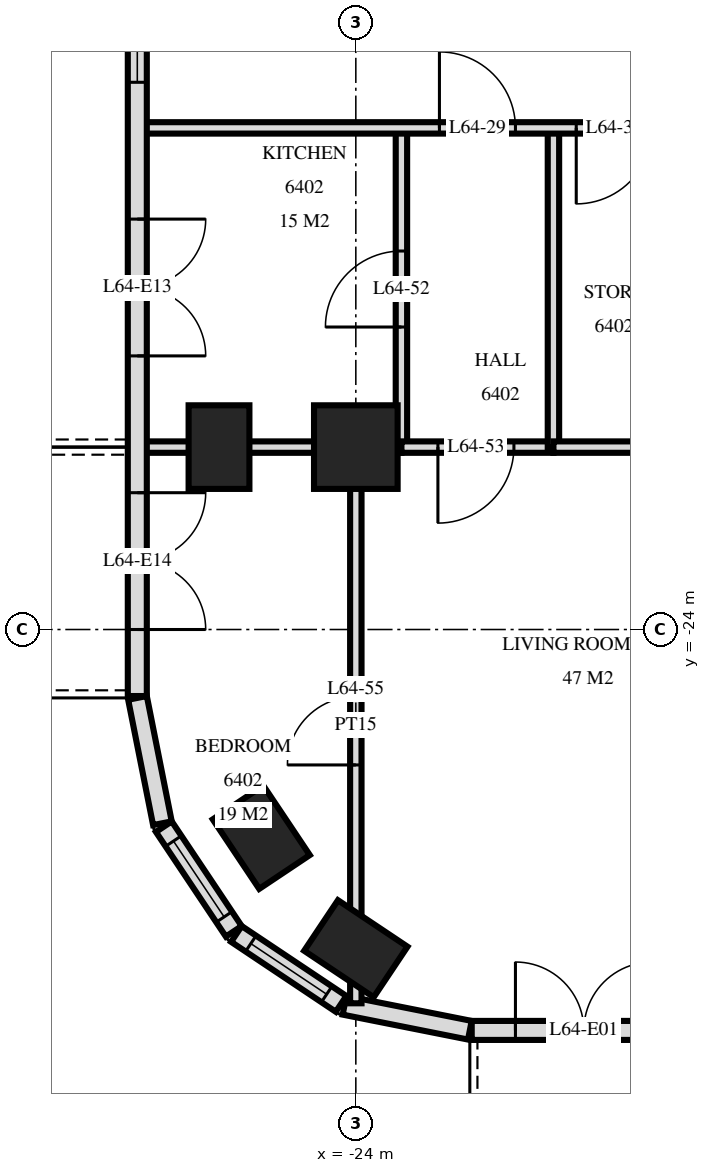
"""IFC4 building model, lengths in metres.
Left out: names, types, materials, properties, quantities, classifications, styles, units other than length and angle.
Written with IfcOpenShell. Run it as: python <this file> out.ifc"""

import sys

from ifc_helpers import new_model, si_unit, direction, frame, frame_2d, origin, origin_2d, place, context, subcontext, project, spatial, rectangle, extrude, element, fill, save


model = new_model("IFC4")
c1 = context("Model", 3, precision=1e-05, world=origin(), true_north=direction((0.0, 1.0)))
c2 = subcontext(c1, "Body", "Model", "MODEL_VIEW")
j1 = project(units=[si_unit("LENGTHUNIT", "METRE"), si_unit("PLANEANGLEUNIT", "RADIAN")], contexts=[c1])
p1 = place(None, origin())
s1 = spatial("IfcSite", under=j1, at=p1, CompositionType="ELEMENT")
p2 = place(p1, origin())
s2 = spatial("IfcBuilding", under=s1, at=p2, CompositionType="ELEMENT")
p3 = place(p2, frame((0.0, 0.0, 243.1)))
s3 = spatial("IfcBuildingStorey", under=s2, at=p3, CompositionType="ELEMENT", Elevation=243.1)
for number, where, z_axis, x_axis in (
    (1, (-25.8, -21.6, 0.0), (0.0, 0.0, 1.0), (0.0, 1.0, 0.0)),
    (2, (-25.244, -26.733, 0.0), (0.0, 0.0, 1.0), (-0.556, 0.831, 0.0)),
    (3, (-24.0, -28.2, 0.0), (0.0, 0.0, 1.0), (-0.831, 0.556, 0.0)),
):
    element("IfcColumn", number, at=place(p3, frame(where, z_axis=z_axis, x_axis=x_axis)), inside=s3, PredefinedType="COLUMN", context=c2, shape_type="SweptSolid", body=[
        extrude(rectangle(XDim=1.1, YDim=0.8, at=origin_2d()), origin(), (0.0, 0.0, 1.0), 3.5),
    ])
p4 = place(p3, frame((-24.0, -21.6, 0.0), z_axis=(0.0, 0.0, 1.0), x_axis=(1.0, 0.0, 0.0)))
e4 = element("IfcColumn", 4, at=p4, inside=s3, PredefinedType="COLUMN", context=c2, shape_type="SweptSolid", body=[
    extrude(rectangle(XDim=1.1, YDim=1.1, at=origin_2d()), origin(), (0.0, 0.0, 1.0), 3.5),
])
p5 = place(p3, frame((-26.875, -3.325, 0.0), z_axis=(0.0, 0.0, 1.0), x_axis=(0.0, -1.0, 0.0)))
e5 = element("IfcWall", 5, at=p5, inside=s3, PredefinedType="SOLIDWALL", context=c2, shape_type="SweptSolid", body=[
    extrude(rectangle(XDim=21.551, YDim=0.25, at=frame_2d((10.775, 0.0))), origin(), (0.0, 0.0, 1.0), 3.2),
])
p6 = place(p5, frame((7.525, 0.0, 0.0)))
e6 = element("IfcOpeningElement", 6, at=p6, cuts=e5, PredefinedType="OPENING", context=c2, shape_type="SweptSolid", body=[
    extrude(rectangle(XDim=1.8, YDim=2.4, at=frame_2d((0.9, 1.2))), frame((0.0, 0.135, 0.0), z_axis=(0.0, -1.0, 0.0), x_axis=(1.0, 0.0, 0.0)), (0.0, 0.0, 1.0), 0.27),
])
p7 = place(p5, frame((12.275, 0.0, 0.9)))
e7 = element("IfcOpeningElement", 7, at=p7, cuts=e5, PredefinedType="OPENING", context=c2, shape_type="SweptSolid", body=[
    extrude(rectangle(XDim=1.2, YDim=1.5, at=frame_2d((0.6, 0.75))), frame((0.0, 0.135, 0.0), z_axis=(0.0, -1.0, 0.0), x_axis=(1.0, 0.0, 0.0)), (0.0, 0.0, 1.0), 0.27),
])
p8 = place(p5, frame((15.275, 0.0, 0.0)))
e8 = element("IfcOpeningElement", 8, at=p8, cuts=e5, PredefinedType="OPENING", context=c2, shape_type="SweptSolid", body=[
    extrude(rectangle(XDim=1.8, YDim=2.4, at=frame_2d((0.9, 1.2))), frame((0.0, 0.135, 0.0), z_axis=(0.0, -1.0, 0.0), x_axis=(1.0, 0.0, 0.0)), (0.0, 0.0, 1.0), 0.27),
])
p9 = place(p5, frame((18.875, 0.0, 0.0)))
e9 = element("IfcOpeningElement", 9, at=p9, cuts=e5, PredefinedType="OPENING", context=c2, shape_type="SweptSolid", body=[
    extrude(rectangle(XDim=1.8, YDim=2.4, at=frame_2d((0.9, 1.2))), frame((0.0, 0.135, 0.0), z_axis=(0.0, -1.0, 0.0), x_axis=(1.0, 0.0, 0.0)), (0.0, 0.0, 1.0), 0.27),
])
p10 = place(p3, frame((-26.873, -24.9, 0.0), z_axis=(0.0, 0.0, 1.0), x_axis=(0.195026884138, -0.980797896849, 0.0)))
e10 = element("IfcWall", 10, at=p10, inside=s3, PredefinedType="SOLIDWALL", context=c2, shape_type="SweptSolid", body=[
    extrude(rectangle(XDim=1.681, YDim=0.25, at=frame_2d((0.841, 0.0))), origin(), (0.0, 0.0, 1.0), 3.2),
])
p11 = place(p3, frame((-26.526, -26.594, 0.0), z_axis=(0.0, 0.0, 1.0), x_axis=(0.55555029066, -0.831482937015, 0.0)))
e11 = element("IfcWall", 11, at=p11, inside=s3, PredefinedType="SOLIDWALL", context=c2, shape_type="SweptSolid", body=[
    extrude(rectangle(XDim=1.656, YDim=0.25, at=frame_2d((0.828, 0.0))), origin(), (0.0, 0.0, 1.0), 3.2),
])
p12 = place(p11, frame((0.228, 0.0, 0.9)))
e12 = element("IfcOpeningElement", 12, at=p12, cuts=e11, PredefinedType="OPENING", context=c2, shape_type="SweptSolid", body=[
    extrude(rectangle(XDim=1.2, YDim=1.5, at=frame_2d((0.6, 0.75))), frame((0.0, 0.135, 0.0), z_axis=(0.0, -1.0, 0.0), x_axis=(1.0, 0.0, 0.0)), (0.0, 0.0, 1.0), 0.27),
])
p13 = place(p3, frame((-25.571, -28.006, 0.0), z_axis=(0.0, 0.0, 1.0), x_axis=(0.831482937015, -0.55555029066, 0.0)))
e13 = element("IfcWall", 13, at=p13, inside=s3, PredefinedType="SOLIDWALL", context=c2, shape_type="SweptSolid", body=[
    extrude(rectangle(XDim=1.656, YDim=0.25, at=frame_2d((0.828, 0.0))), origin(), (0.0, 0.0, 1.0), 3.2),
])
p14 = place(p13, frame((0.228, 0.0, 0.9)))
e14 = element("IfcOpeningElement", 14, at=p14, cuts=e13, PredefinedType="OPENING", context=c2, shape_type="SweptSolid", body=[
    extrude(rectangle(XDim=1.2, YDim=1.5, at=frame_2d((0.6, 0.75))), frame((0.0, 0.135, 0.0), z_axis=(0.0, -1.0, 0.0), x_axis=(1.0, 0.0, 0.0)), (0.0, 0.0, 1.0), 0.27),
])
p15 = place(p3, frame((-24.149, -28.945, 0.0), z_axis=(0.0, 0.0, 1.0), x_axis=(0.980775640221, -0.19513878023, 0.0)))
e15 = element("IfcWall", 15, at=p15, inside=s3, PredefinedType="SOLIDWALL", context=c2, shape_type="SweptSolid", body=[
    extrude(rectangle(XDim=1.681, YDim=0.25, at=frame_2d((0.841, 0.0))), origin(), (0.0, 0.0, 1.0), 3.2),
])
p16 = place(p3, frame((-22.475, -29.275, 0.0), z_axis=(0.0, 0.0, 1.0), x_axis=(1.0, 0.0, 0.0)))
e16 = element("IfcWall", 16, at=p16, inside=s3, PredefinedType="SOLIDWALL", context=c2, shape_type="SweptSolid", body=[
    extrude(rectangle(XDim=44.951, YDim=0.25, at=frame_2d((22.475, 0.0))), origin(), (0.0, 0.0, 1.0), 3.2),
])
p17 = place(p16, frame((0.575, 0.0, 0.0)))
e17 = element("IfcOpeningElement", 17, at=p17, cuts=e16, PredefinedType="OPENING", context=c2, shape_type="SweptSolid", body=[
    extrude(rectangle(XDim=1.8, YDim=2.4, at=frame_2d((0.9, 1.2))), frame((0.0, 0.135, 0.0), z_axis=(0.0, -1.0, 0.0), x_axis=(1.0, 0.0, 0.0)), (0.0, 0.0, 1.0), 0.27),
])
p18 = place(p16, frame((4.775, 0.0, 0.9)))
e18 = element("IfcOpeningElement", 18, at=p18, cuts=e16, PredefinedType="OPENING", context=c2, shape_type="SweptSolid", body=[
    extrude(rectangle(XDim=2.4, YDim=1.5, at=frame_2d((1.2, 0.75))), frame((0.0, 0.135, 0.0), z_axis=(0.0, -1.0, 0.0), x_axis=(1.0, 0.0, 0.0)), (0.0, 0.0, 1.0), 0.27),
])
p19 = place(p16, frame((8.075, 0.0, 0.0)))
e19 = element("IfcOpeningElement", 19, at=p19, cuts=e16, PredefinedType="OPENING", context=c2, shape_type="SweptSolid", body=[
    extrude(rectangle(XDim=1.8, YDim=2.4, at=frame_2d((0.9, 1.2))), frame((0.0, 0.135, 0.0), z_axis=(0.0, -1.0, 0.0), x_axis=(1.0, 0.0, 0.0)), (0.0, 0.0, 1.0), 0.27),
])
p20 = place(p16, frame((11.075, 0.0, 0.0)))
e20 = element("IfcOpeningElement", 20, at=p20, cuts=e16, PredefinedType="OPENING", context=c2, shape_type="SweptSolid", body=[
    extrude(rectangle(XDim=1.8, YDim=2.4, at=frame_2d((0.9, 1.2))), frame((0.0, 0.135, 0.0), z_axis=(0.0, -1.0, 0.0), x_axis=(1.0, 0.0, 0.0)), (0.0, 0.0, 1.0), 0.27),
])
p21 = place(p16, frame((13.775, 0.0, 0.9)))
e21 = element("IfcOpeningElement", 21, at=p21, cuts=e16, PredefinedType="OPENING", context=c2, shape_type="SweptSolid", body=[
    extrude(rectangle(XDim=2.4, YDim=1.5, at=frame_2d((1.2, 0.75))), frame((0.0, 0.135, 0.0), z_axis=(0.0, -1.0, 0.0), x_axis=(1.0, 0.0, 0.0)), (0.0, 0.0, 1.0), 0.27),
])
p22 = place(p16, frame((16.775, 0.0, 0.9)))
e22 = element("IfcOpeningElement", 22, at=p22, cuts=e16, PredefinedType="OPENING", context=c2, shape_type="SweptSolid", body=[
    extrude(rectangle(XDim=2.4, YDim=1.5, at=frame_2d((1.2, 0.75))), frame((0.0, 0.135, 0.0), z_axis=(0.0, -1.0, 0.0), x_axis=(1.0, 0.0, 0.0)), (0.0, 0.0, 1.0), 0.27),
])
p23 = place(p16, frame((20.075, 0.0, 0.0)))
e23 = element("IfcOpeningElement", 23, at=p23, cuts=e16, PredefinedType="OPENING", context=c2, shape_type="SweptSolid", body=[
    extrude(rectangle(XDim=1.8, YDim=2.4, at=frame_2d((0.9, 1.2))), frame((0.0, 0.135, 0.0), z_axis=(0.0, -1.0, 0.0), x_axis=(1.0, 0.0, 0.0)), (0.0, 0.0, 1.0), 0.27),
])
p24 = place(p16, frame((23.075, 0.0, 0.0)))
e24 = element("IfcOpeningElement", 24, at=p24, cuts=e16, PredefinedType="OPENING", context=c2, shape_type="SweptSolid", body=[
    extrude(rectangle(XDim=1.8, YDim=2.4, at=frame_2d((0.9, 1.2))), frame((0.0, 0.135, 0.0), z_axis=(0.0, -1.0, 0.0), x_axis=(1.0, 0.0, 0.0)), (0.0, 0.0, 1.0), 0.27),
])
p25 = place(p16, frame((25.775, 0.0, 0.9)))
e25 = element("IfcOpeningElement", 25, at=p25, cuts=e16, PredefinedType="OPENING", context=c2, shape_type="SweptSolid", body=[
    extrude(rectangle(XDim=2.4, YDim=1.5, at=frame_2d((1.2, 0.75))), frame((0.0, 0.135, 0.0), z_axis=(0.0, -1.0, 0.0), x_axis=(1.0, 0.0, 0.0)), (0.0, 0.0, 1.0), 0.27),
])
p26 = place(p16, frame((29.075, 0.0, 0.0)))
e26 = element("IfcOpeningElement", 26, at=p26, cuts=e16, PredefinedType="OPENING", context=c2, shape_type="SweptSolid", body=[
    extrude(rectangle(XDim=1.8, YDim=2.4, at=frame_2d((0.9, 1.2))), frame((0.0, 0.135, 0.0), z_axis=(0.0, -1.0, 0.0), x_axis=(1.0, 0.0, 0.0)), (0.0, 0.0, 1.0), 0.27),
])
p27 = place(p16, frame((31.775, 0.0, 0.9)))
e27 = element("IfcOpeningElement", 27, at=p27, cuts=e16, PredefinedType="OPENING", context=c2, shape_type="SweptSolid", body=[
    extrude(rectangle(XDim=2.4, YDim=1.5, at=frame_2d((1.2, 0.75))), frame((0.0, 0.135, 0.0), z_axis=(0.0, -1.0, 0.0), x_axis=(1.0, 0.0, 0.0)), (0.0, 0.0, 1.0), 0.27),
])
p28 = place(p16, frame((35.075, 0.0, 0.0)))
e28 = element("IfcOpeningElement", 28, at=p28, cuts=e16, PredefinedType="OPENING", context=c2, shape_type="SweptSolid", body=[
    extrude(rectangle(XDim=1.8, YDim=2.4, at=frame_2d((0.9, 1.2))), frame((0.0, 0.135, 0.0), z_axis=(0.0, -1.0, 0.0), x_axis=(1.0, 0.0, 0.0)), (0.0, 0.0, 1.0), 0.27),
])
p29 = place(p16, frame((41.075, 0.0, 0.0)))
e29 = element("IfcOpeningElement", 29, at=p29, cuts=e16, PredefinedType="OPENING", context=c2, shape_type="SweptSolid", body=[
    extrude(rectangle(XDim=1.8, YDim=2.4, at=frame_2d((0.9, 1.2))), frame((0.0, 0.135, 0.0), z_axis=(0.0, -1.0, 0.0), x_axis=(1.0, 0.0, 0.0)), (0.0, 0.0, 1.0), 0.27),
])
p30 = place(p3, frame((-21.4, -21.6, 0.0), z_axis=(0.0, 0.0, 1.0), x_axis=(0.0, 1.0, 0.0)))
e30 = element("IfcWall", 30, at=p30, inside=s3, PredefinedType="PARTITIONING", context=c2, shape_type="SweptSolid", body=[
    extrude(rectangle(XDim=4.2, YDim=0.15, at=frame_2d((2.1, 0.0))), origin(), (0.0, 0.0, 1.0), 3.22),
])
p31 = place(p3, frame((-23.4, -21.6, 0.0), z_axis=(0.0, 0.0, 1.0), x_axis=(0.0, 1.0, 0.0)))
e31 = element("IfcWall", 31, at=p31, inside=s3, PredefinedType="PARTITIONING", context=c2, shape_type="SweptSolid", body=[
    extrude(rectangle(XDim=4.2, YDim=0.15, at=frame_2d((2.1, 0.0))), origin(), (0.0, 0.0, 1.0), 3.22),
])
p32 = place(p31, frame((1.58, 0.0, 0.0)))
e32 = element("IfcOpeningElement", 32, at=p32, cuts=e31, PredefinedType="OPENING", context=c2, shape_type="SweptSolid", body=[
    extrude(rectangle(XDim=1.0, YDim=2.1, at=frame_2d((0.5, 1.05))), frame((0.0, 0.085, 0.0), z_axis=(0.0, -1.0, 0.0), x_axis=(1.0, 0.0, 0.0)), (0.0, 0.0, 1.0), 0.17),
])
p33 = place(p3, frame((-24.0, -28.918, 0.0), z_axis=(0.0, 0.0, 1.0), x_axis=(0.0, 1.0, 0.0)))
e33 = element("IfcWall", 33, at=p33, inside=s3, PredefinedType="PARTITIONING", context=c2, shape_type="SweptSolid", body=[
    extrude(rectangle(XDim=7.318, YDim=0.15, at=frame_2d((3.659, 0.0))), origin(), (0.0, 0.0, 1.0), 3.22),
])
p34 = place(p33, frame((3.136, 0.0, 0.0)))
e34 = element("IfcOpeningElement", 34, at=p34, cuts=e33, PredefinedType="OPENING", context=c2, shape_type="SweptSolid", body=[
    extrude(rectangle(XDim=0.9, YDim=2.1, at=frame_2d((0.45, 1.05))), frame((0.0, 0.085, 0.0), z_axis=(0.0, -1.0, 0.0), x_axis=(1.0, 0.0, 0.0)), (0.0, 0.0, 1.0), 0.17),
])
p35 = place(p3, frame((-23.4, -21.6, 0.0), z_axis=(0.0, 0.0, 1.0), x_axis=(1.0, 0.0, 0.0)))
e35 = element("IfcWall", 35, at=p35, inside=s3, PredefinedType="PARTITIONING", context=c2, shape_type="SweptSolid", body=[
    extrude(rectangle(XDim=2.0, YDim=0.15, at=frame_2d((1.0, 0.0))), origin(), (0.0, 0.0, 1.0), 3.22),
])
p36 = place(p35, frame((0.48, 0.0, 0.0)))
e36 = element("IfcOpeningElement", 36, at=p36, cuts=e35, PredefinedType="OPENING", context=c2, shape_type="SweptSolid", body=[
    extrude(rectangle(XDim=1.0, YDim=2.1, at=frame_2d((0.5, 1.05))), frame((0.0, 0.085, 0.0), z_axis=(0.0, -1.0, 0.0), x_axis=(1.0, 0.0, 0.0)), (0.0, 0.0, 1.0), 0.17),
])
p37 = place(p3, frame((-26.82, -21.6, 0.0), z_axis=(0.0, 0.0, 1.0), x_axis=(1.0, 0.0, 0.0)))
e37 = element("IfcWall", 37, at=p37, inside=s3, PredefinedType="PARTITIONING", context=c2, shape_type="SweptSolid", body=[
    extrude(rectangle(XDim=3.42, YDim=0.15, at=frame_2d((1.71, 0.0))), origin(), (0.0, 0.0, 1.0), 3.22),
])
p38 = place(p3, frame((-21.4, -21.6, 0.0), z_axis=(0.0, 0.0, 1.0), x_axis=(1.0, 0.0, 0.0)))
e38 = element("IfcWall", 38, at=p38, inside=s3, PredefinedType="PARTITIONING", context=c2, shape_type="SweptSolid", body=[
    extrude(rectangle(XDim=6.4, YDim=0.15, at=frame_2d((3.2, 0.0))), origin(), (0.0, 0.0, 1.0), 3.22),
])
p39 = place(p38, frame((4.78, 0.0, 0.0)))
e39 = element("IfcOpeningElement", 39, at=p39, cuts=e38, PredefinedType="OPENING", context=c2, shape_type="SweptSolid", body=[
    extrude(rectangle(XDim=0.8, YDim=2.1, at=frame_2d((0.4, 1.05))), frame((0.0, 0.085, 0.0), z_axis=(0.0, -1.0, 0.0), x_axis=(1.0, 0.0, 0.0)), (0.0, 0.0, 1.0), 0.17),
])
p40 = place(p38, frame((1.95, 0.0, 0.0)))
e40 = element("IfcOpeningElement", 40, at=p40, cuts=e38, PredefinedType="OPENING", context=c2, shape_type="SweptSolid", body=[
    extrude(rectangle(XDim=0.8, YDim=2.1, at=frame_2d((0.4, 1.05))), frame((0.0, 0.085, 0.0), z_axis=(0.0, -1.0, 0.0), x_axis=(1.0, 0.0, 0.0)), (0.0, 0.0, 1.0), 0.17),
])
p41 = place(p3, frame((-26.82, -17.4, 0.0), z_axis=(0.0, 0.0, 1.0), x_axis=(1.0, 0.0, 0.0)))
e41 = element("IfcWall", 41, at=p41, inside=s3, PredefinedType="PARTITIONING", context=c2, shape_type="SweptSolid", body=[
    extrude(rectangle(XDim=53.64, YDim=0.15, at=frame_2d((26.82, 0.0))), origin(), (0.0, 0.0, 1.0), 3.22),
])
p42 = place(p41, frame((11.97, 0.0, 0.0)))
e42 = element("IfcOpeningElement", 42, at=p42, cuts=e41, PredefinedType="OPENING", context=c2, shape_type="SweptSolid", body=[
    extrude(rectangle(XDim=1.0, YDim=2.1, at=frame_2d((0.5, 1.05))), frame((0.0, 0.085, 0.0), z_axis=(0.0, -1.0, 0.0), x_axis=(1.0, 0.0, 0.0)), (0.0, 0.0, 1.0), 0.17),
])
p43 = place(p41, frame((3.92, 0.0, 0.0)))
e43 = element("IfcOpeningElement", 43, at=p43, cuts=e41, PredefinedType="OPENING", context=c2, shape_type="SweptSolid", body=[
    extrude(rectangle(XDim=1.0, YDim=2.1, at=frame_2d((0.5, 1.05))), frame((0.0, 0.085, 0.0), z_axis=(0.0, -1.0, 0.0), x_axis=(1.0, 0.0, 0.0)), (0.0, 0.0, 1.0), 0.17),
])
p44 = place(p41, frame((5.72, 0.0, 0.0)))
e44 = element("IfcOpeningElement", 44, at=p44, cuts=e41, PredefinedType="OPENING", context=c2, shape_type="SweptSolid", body=[
    extrude(rectangle(XDim=1.0, YDim=2.1, at=frame_2d((0.5, 1.05))), frame((0.0, 0.085, 0.0), z_axis=(0.0, -1.0, 0.0), x_axis=(1.0, 0.0, 0.0)), (0.0, 0.0, 1.0), 0.17),
])
p45 = place(p41, frame((47.72, 0.0, 0.0)))
e45 = element("IfcOpeningElement", 45, at=p45, cuts=e41, PredefinedType="OPENING", context=c2, shape_type="SweptSolid", body=[
    extrude(rectangle(XDim=1.0, YDim=2.1, at=frame_2d((0.5, 1.05))), frame((0.0, 0.085, 0.0), z_axis=(0.0, -1.0, 0.0), x_axis=(1.0, 0.0, 0.0)), (0.0, 0.0, 1.0), 0.17),
])
p46 = place(p41, frame((51.02, 0.0, 0.0)))
e46 = element("IfcOpeningElement", 46, at=p46, cuts=e41, PredefinedType="OPENING", context=c2, shape_type="SweptSolid", body=[
    extrude(rectangle(XDim=1.0, YDim=2.1, at=frame_2d((0.5, 1.05))), frame((0.0, 0.085, 0.0), z_axis=(0.0, -1.0, 0.0), x_axis=(1.0, 0.0, 0.0)), (0.0, 0.0, 1.0), 0.17),
])
p47 = place(p41, frame((17.32, 0.0, 0.0)))
e47 = element("IfcOpeningElement", 47, at=p47, cuts=e41, PredefinedType="OPENING", context=c2, shape_type="SweptSolid", body=[
    extrude(rectangle(XDim=1.0, YDim=2.1, at=frame_2d((0.5, 1.05))), frame((0.0, 0.085, 0.0), z_axis=(0.0, -1.0, 0.0), x_axis=(1.0, 0.0, 0.0)), (0.0, 0.0, 1.0), 0.17),
])
p48 = place(p41, frame((23.32, 0.0, 0.0)))
e48 = element("IfcOpeningElement", 48, at=p48, cuts=e41, PredefinedType="OPENING", context=c2, shape_type="SweptSolid", body=[
    extrude(rectangle(XDim=1.0, YDim=2.1, at=frame_2d((0.5, 1.05))), frame((0.0, 0.085, 0.0), z_axis=(0.0, -1.0, 0.0), x_axis=(1.0, 0.0, 0.0)), (0.0, 0.0, 1.0), 0.17),
])
p49 = place(p41, frame((29.32, 0.0, 0.0)))
e49 = element("IfcOpeningElement", 49, at=p49, cuts=e41, PredefinedType="OPENING", context=c2, shape_type="SweptSolid", body=[
    extrude(rectangle(XDim=1.0, YDim=2.1, at=frame_2d((0.5, 1.05))), frame((0.0, 0.085, 0.0), z_axis=(0.0, -1.0, 0.0), x_axis=(1.0, 0.0, 0.0)), (0.0, 0.0, 1.0), 0.17),
])
p50 = place(p41, frame((35.32, 0.0, 0.0)))
e50 = element("IfcOpeningElement", 50, at=p50, cuts=e41, PredefinedType="OPENING", context=c2, shape_type="SweptSolid", body=[
    extrude(rectangle(XDim=1.0, YDim=2.1, at=frame_2d((0.5, 1.05))), frame((0.0, 0.085, 0.0), z_axis=(0.0, -1.0, 0.0), x_axis=(1.0, 0.0, 0.0)), (0.0, 0.0, 1.0), 0.17),
])
p51 = place(p12, origin())
e51 = element("IfcWindow", 51, at=p51, inside=s3, PartitioningType="SINGLE_PANEL", PredefinedType="WINDOW", context=c2, shape_type="SweptSolid", body=[
    extrude(rectangle(XDim=1.2, YDim=1.5, at=frame_2d((0.6, 0.75))), frame((0.0, 0.03, 0.0), z_axis=(0.0, -1.0, 0.0), x_axis=(1.0, 0.0, 0.0)), (0.0, 0.0, 1.0), 0.06),
])
fill(e12, e51)
p52 = place(p14, origin())
e52 = element("IfcWindow", 52, at=p52, inside=s3, PartitioningType="SINGLE_PANEL", PredefinedType="WINDOW", context=c2, shape_type="SweptSolid", body=[
    extrude(rectangle(XDim=1.2, YDim=1.5, at=frame_2d((0.6, 0.75))), frame((0.0, 0.03, 0.0), z_axis=(0.0, -1.0, 0.0), x_axis=(1.0, 0.0, 0.0)), (0.0, 0.0, 1.0), 0.06),
])
fill(e14, e52)
p53 = place(p17, origin())
e53 = element("IfcDoor", 53, at=p53, inside=s3, OperationType="DOUBLE_DOOR_SINGLE_SWING", PredefinedType="DOOR", context=c2, shape_type="SweptSolid", body=[
    extrude(rectangle(XDim=1.8, YDim=2.4, at=frame_2d((0.9, 1.2))), frame((0.0, 0.025, 0.0), z_axis=(0.0, -1.0, 0.0), x_axis=(1.0, 0.0, 0.0)), (0.0, 0.0, 1.0), 0.05),
])
fill(e17, e53)
p54 = place(p7, origin())
e54 = element("IfcWindow", 54, at=p54, inside=s3, PartitioningType="SINGLE_PANEL", PredefinedType="WINDOW", context=c2, shape_type="SweptSolid", body=[
    extrude(rectangle(XDim=1.2, YDim=1.5, at=frame_2d((0.6, 0.75))), frame((0.0, 0.03, 0.0), z_axis=(0.0, -1.0, 0.0), x_axis=(1.0, 0.0, 0.0)), (0.0, 0.0, 1.0), 0.06),
])
fill(e7, e54)
p55 = place(p8, origin())
e55 = element("IfcDoor", 55, at=p55, inside=s3, OperationType="DOUBLE_DOOR_SINGLE_SWING", PredefinedType="DOOR", context=c2, shape_type="SweptSolid", body=[
    extrude(rectangle(XDim=1.8, YDim=2.4, at=frame_2d((0.9, 1.2))), frame((0.0, 0.025, 0.0), z_axis=(0.0, -1.0, 0.0), x_axis=(1.0, 0.0, 0.0)), (0.0, 0.0, 1.0), 0.05),
])
fill(e8, e55)
p56 = place(p9, origin())
e56 = element("IfcDoor", 56, at=p56, inside=s3, OperationType="DOUBLE_DOOR_SINGLE_SWING", PredefinedType="DOOR", context=c2, shape_type="SweptSolid", body=[
    extrude(rectangle(XDim=1.8, YDim=2.4, at=frame_2d((0.9, 1.2))), frame((0.0, 0.025, 0.0), z_axis=(0.0, -1.0, 0.0), x_axis=(1.0, 0.0, 0.0)), (0.0, 0.0, 1.0), 0.05),
])
fill(e9, e56)
p57 = place(p43, origin())
e57 = element("IfcDoor", 57, at=p57, inside=s3, OperationType="SINGLE_SWING_RIGHT", PredefinedType="DOOR", context=c2, shape_type="SweptSolid", body=[
    extrude(rectangle(XDim=1.0, YDim=2.1, at=frame_2d((0.5, 1.05))), frame((0.0, 0.025, 0.0), z_axis=(0.0, -1.0, 0.0), x_axis=(1.0, 0.0, 0.0)), (0.0, 0.0, 1.0), 0.05),
])
fill(e43, e57)
p58 = place(p44, frame((0.5, 0.0, 0.0), z_axis=(0.0, 0.0, 1.0), x_axis=(-1.0, 0.0, 0.0)))
e58 = element("IfcDoor", 58, at=p58, inside=s3, OperationType="SINGLE_SWING_LEFT", PredefinedType="DOOR", context=c2, shape_type="SweptSolid", body=[
    extrude(rectangle(XDim=1.0, YDim=2.1, at=frame_2d((0.0, 1.05))), frame((0.0, -0.025, 0.0), z_axis=(0.0, 1.0, 0.0), x_axis=(-1.0, 0.0, 0.0)), (0.0, 0.0, 1.0), 0.05),
])
fill(e44, e58)
p59 = place(p32, origin())
e59 = element("IfcDoor", 59, at=p59, inside=s3, OperationType="SINGLE_SWING_RIGHT", PredefinedType="DOOR", context=c2, shape_type="SweptSolid", body=[
    extrude(rectangle(XDim=1.0, YDim=2.1, at=frame_2d((0.5, 1.05))), frame((0.0, 0.025, 0.0), z_axis=(0.0, -1.0, 0.0), x_axis=(1.0, 0.0, 0.0)), (0.0, 0.0, 1.0), 0.05),
])
fill(e32, e59)
p60 = place(p36, frame((0.5, 0.0, 0.0), z_axis=(0.0, 0.0, 1.0), x_axis=(-1.0, 0.0, 0.0)))
e60 = element("IfcDoor", 60, at=p60, inside=s3, OperationType="SINGLE_SWING_LEFT", PredefinedType="DOOR", context=c2, shape_type="SweptSolid", body=[
    extrude(rectangle(XDim=1.0, YDim=2.1, at=frame_2d((0.0, 1.05))), frame((0.0, -0.025, 0.0), z_axis=(0.0, 1.0, 0.0), x_axis=(-1.0, 0.0, 0.0)), (0.0, 0.0, 1.0), 0.05),
])
fill(e36, e60)
p61 = place(p34, origin())
e61 = element("IfcDoor", 61, at=p61, inside=s3, OperationType="SINGLE_SWING_RIGHT", PredefinedType="DOOR", context=c2, shape_type="SweptSolid", body=[
    extrude(rectangle(XDim=0.9, YDim=2.1, at=frame_2d((0.45, 1.05))), frame((0.0, 0.025, 0.0), z_axis=(0.0, -1.0, 0.0), x_axis=(1.0, 0.0, 0.0)), (0.0, 0.0, 1.0), 0.05),
])
fill(e34, e61)
save(model, sys.argv[1])
